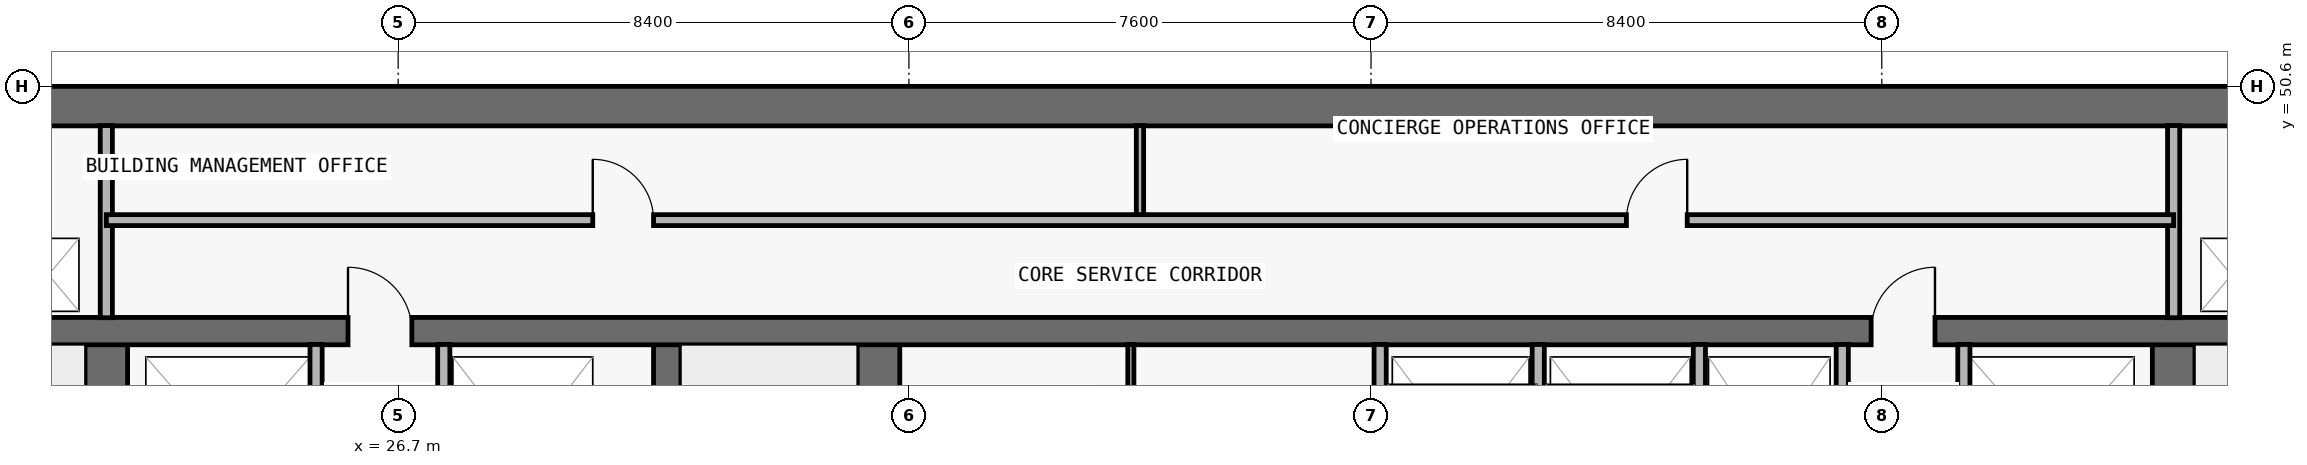
"""IFC4 building model, lengths in metres.
Left out: names, types, materials, properties, quantities, classifications, styles, units other than length and angle.
Written with IfcOpenShell. Run it as: python <this file> out.ifc"""

import sys

from ifc_helpers import new_model, si_unit, direction, frame, frame_2d, origin, place, context, subcontext, project, spatial, rectangle, extrude, element, fill, save


model = new_model("IFC4")
c1 = context("Model", 3, precision=1e-05, world=origin(), true_north=direction((0.0, 1.0)))
c2 = subcontext(c1, "Body", "Model", "MODEL_VIEW")
j1 = project(units=[si_unit("LENGTHUNIT", "METRE"), si_unit("PLANEANGLEUNIT", "RADIAN")], contexts=[c1])
p1 = place(None, origin())
s1 = spatial("IfcSite", under=j1, at=p1, CompositionType="ELEMENT")
p2 = place(p1, origin())
s2 = spatial("IfcBuilding", under=s1, at=p2, CompositionType="ELEMENT")
p3 = place(p2, frame((0.0, 0.0, 173.7)))
s3 = spatial("IfcBuildingStorey", under=s2, at=p3, CompositionType="ELEMENT", Elevation=173.7)
p4 = place(p3, frame((17.95, 50.275, 0.0), z_axis=(0.0, 0.0, 1.0), x_axis=(1.0, 0.0, 0.0)))
e1 = element("IfcWall", 1, at=p4, inside=s3, PredefinedType="SHEAR", context=c2, shape_type="SweptSolid", body=[
    extrude(rectangle(XDim=41.9, YDim=0.65, at=frame_2d((20.95, 0.0))), origin(), (0.0, 0.0, 1.0), 3.05),
])
p5 = place(p3, frame((21.9, 37.0, 0.0), z_axis=(0.0, 0.0, 1.0), x_axis=(0.0, 1.0, 0.0)))
e2 = element("IfcWall", 2, at=p5, inside=s3, PredefinedType="SHEAR", context=c2, shape_type="SweptSolid", body=[
    extrude(rectangle(XDim=9.575, YDim=0.7, at=frame_2d((4.788, 0.0))), origin(), (0.0, 0.0, 1.0), 3.05),
])
p6 = place(p5, frame((0.55, 0.0, 0.0)))
e3 = element("IfcOpeningElement", 3, at=p6, cuts=e2, PredefinedType="OPENING", context=c2, shape_type="SweptSolid", body=[
    extrude(rectangle(XDim=1.1, YDim=2.15, at=frame_2d((0.55, 1.075))), frame((0.0, 0.36, 0.0), z_axis=(0.0, -1.0, 0.0), x_axis=(1.0, 0.0, 0.0)), (0.0, 0.0, 1.0), 0.72),
])
p7 = place(p3, frame((55.9, 37.0, 0.0), z_axis=(0.0, 0.0, 1.0), x_axis=(0.0, 1.0, 0.0)))
e4 = element("IfcWall", 4, at=p7, inside=s3, PredefinedType="SHEAR", context=c2, shape_type="SweptSolid", body=[
    extrude(rectangle(XDim=9.575, YDim=0.7, at=frame_2d((4.788, 0.0))), origin(), (0.0, 0.0, 1.0), 3.05),
])
p8 = place(p7, frame((0.55, 0.0, 0.0)))
e5 = element("IfcOpeningElement", 5, at=p8, cuts=e4, PredefinedType="OPENING", context=c2, shape_type="SweptSolid", body=[
    extrude(rectangle(XDim=1.1, YDim=2.15, at=frame_2d((0.55, 1.075))), frame((0.0, 0.36, 0.0), z_axis=(0.0, -1.0, 0.0), x_axis=(1.0, 0.0, 0.0)), (0.0, 0.0, 1.0), 0.72),
])
p9 = place(p3, frame((31.125, 37.0, 0.0), z_axis=(0.0, 0.0, 1.0), x_axis=(0.0, 1.0, 0.0)))
e6 = element("IfcWall", 6, at=p9, inside=s3, PredefinedType="SHEAR", context=c2, shape_type="SweptSolid", body=[
    extrude(rectangle(XDim=9.575, YDim=0.45, at=frame_2d((4.788, 0.0))), origin(), (0.0, 0.0, 1.0), 3.05),
])
p10 = place(p3, frame((34.6, 37.0, 0.0), z_axis=(0.0, 0.0, 1.0), x_axis=(0.0, 1.0, 0.0)))
e7 = element("IfcWall", 7, at=p10, inside=s3, PredefinedType="SHEAR", context=c2, shape_type="SweptSolid", body=[
    extrude(rectangle(XDim=9.575, YDim=0.7, at=frame_2d((4.788, 0.0))), origin(), (0.0, 0.0, 1.0), 3.05),
])
p11 = place(p3, frame((18.3, 46.575, 0.0), z_axis=(0.0, 0.0, 1.0), x_axis=(1.0, 0.0, 0.0)))
e8 = element("IfcWall", 8, at=p11, inside=s3, PredefinedType="SHEAR", context=c2, shape_type="SweptSolid", body=[
    extrude(rectangle(XDim=41.2, YDim=0.45, at=frame_2d((20.6, 0.0))), origin(), (0.0, 0.0, 1.0), 3.05),
])
p12 = place(p11, frame((7.575, 0.0, 0.0)))
e9 = element("IfcOpeningElement", 9, at=p12, cuts=e8, PredefinedType="OPENING", context=c2, shape_type="SweptSolid", body=[
    extrude(rectangle(XDim=1.05, YDim=2.15, at=frame_2d((0.525, 1.075))), frame((0.0, 0.235, 0.0), z_axis=(0.0, -1.0, 0.0), x_axis=(1.0, 0.0, 0.0)), (0.0, 0.0, 1.0), 0.47),
])
p13 = place(p11, frame((32.625, 0.0, 0.0)))
e10 = element("IfcOpeningElement", 10, at=p13, cuts=e8, PredefinedType="OPENING", context=c2, shape_type="SweptSolid", body=[
    extrude(rectangle(XDim=1.05, YDim=2.15, at=frame_2d((0.525, 1.075))), frame((0.0, 0.235, 0.0), z_axis=(0.0, -1.0, 0.0), x_axis=(1.0, 0.0, 0.0)), (0.0, 0.0, 1.0), 0.47),
])
p14 = place(p3, frame((21.9, 46.795, 0.0), z_axis=(0.0, 0.0, 1.0), x_axis=(0.0, 1.0, 0.0)))
e11 = element("IfcWall", 11, at=p14, inside=s3, PredefinedType="PARTITIONING", context=c2, shape_type="SweptSolid", body=[
    extrude(rectangle(XDim=3.16, YDim=0.2, at=frame_2d((1.58, 0.0))), origin(), (0.0, 0.0, 1.0), 3.05),
])
for number, where, z_axis, x_axis in (
    (12, (25.35, 43.17, 0.0), (0.0, 0.0, 1.0), (0.0, 1.0, 0.0)),
    (13, (27.45, 43.17, 0.0), (0.0, 0.0, 1.0), (0.0, 1.0, 0.0)),
):
    element("IfcWall", number, at=place(p3, frame(where, z_axis=z_axis, x_axis=x_axis)), inside=s3, PredefinedType="PARTITIONING", context=c2, shape_type="SweptSolid", body=[
        extrude(rectangle(XDim=3.185, YDim=0.2, at=frame_2d((1.593, 0.0))), origin(), (0.0, 0.0, 1.0), 3.05),
    ])
p15 = place(p3, frame((38.75, 43.17, 0.0), z_axis=(0.0, 0.0, 1.0), x_axis=(0.0, 1.0, 0.0)))
e14 = element("IfcWall", 14, at=p15, inside=s3, PredefinedType="MOVABLE", context=c2, shape_type="SweptSolid", body=[
    extrude(rectangle(XDim=3.185, YDim=0.1, at=frame_2d((1.593, 0.0))), origin(), (0.0, 0.0, 1.0), 3.05),
])
p16 = place(p3, frame((38.9, 48.4, 0.0), z_axis=(0.0, 0.0, 1.0), x_axis=(0.0, 1.0, 0.0)))
e15 = element("IfcWall", 15, at=p16, inside=s3, PredefinedType="PARTITIONING", context=c2, shape_type="SweptSolid", body=[
    extrude(rectangle(XDim=1.555, YDim=0.12, at=frame_2d((0.778, 0.0))), origin(), (0.0, 0.0, 1.0), 3.05),
])
for number, where, z_axis, x_axis in (
    (16, (42.85, 43.17, 0.0), (0.0, 0.0, 1.0), (0.0, 1.0, 0.0)),
    (17, (45.45, 43.17, 0.0), (0.0, 0.0, 1.0), (0.0, 1.0, 0.0)),
    (18, (48.1, 43.17, 0.0), (0.0, 0.0, 1.0), (0.0, 1.0, 0.0)),
    (19, (50.45, 43.17, 0.0), (0.0, 0.0, 1.0), (0.0, 1.0, 0.0)),
    (20, (52.45, 43.17, 0.0), (0.0, 0.0, 1.0), (0.0, 1.0, 0.0)),
):
    element("IfcWall", number, at=place(p3, frame(where, z_axis=z_axis, x_axis=x_axis)), inside=s3, PredefinedType="PARTITIONING", context=c2, shape_type="SweptSolid", body=[
        extrude(rectangle(XDim=3.185, YDim=0.2, at=frame_2d((1.593, 0.0))), origin(), (0.0, 0.0, 1.0), 3.05),
    ])
p17 = place(p3, frame((55.9, 46.795, 0.0), z_axis=(0.0, 0.0, 1.0), x_axis=(0.0, 1.0, 0.0)))
e21 = element("IfcWall", 21, at=p17, inside=s3, PredefinedType="PARTITIONING", context=c2, shape_type="SweptSolid", body=[
    extrude(rectangle(XDim=3.16, YDim=0.2, at=frame_2d((1.58, 0.0))), origin(), (0.0, 0.0, 1.0), 3.05),
])
p18 = place(p3, frame((21.9, 48.4, 0.0), z_axis=(0.0, 0.0, 1.0), x_axis=(1.0, 0.0, 0.0)))
e22 = element("IfcWall", 22, at=p18, inside=s3, PredefinedType="PARTITIONING", context=c2, shape_type="SweptSolid", body=[
    extrude(rectangle(XDim=34.0, YDim=0.18, at=frame_2d((17.0, 0.0))), origin(), (0.0, 0.0, 1.0), 3.05),
])
p19 = place(p18, frame((8.0, 0.0, 0.0)))
e23 = element("IfcOpeningElement", 23, at=p19, cuts=e22, PredefinedType="OPENING", context=c2, shape_type="SweptSolid", body=[
    extrude(rectangle(XDim=1.0, YDim=2.2, at=frame_2d((0.5, 1.1))), frame((0.0, 0.1, 0.0), z_axis=(0.0, -1.0, 0.0), x_axis=(1.0, 0.0, 0.0)), (0.0, 0.0, 1.0), 0.2),
])
p20 = place(p18, frame((25.0, 0.0, 0.0)))
e24 = element("IfcOpeningElement", 24, at=p20, cuts=e22, PredefinedType="OPENING", context=c2, shape_type="SweptSolid", body=[
    extrude(rectangle(XDim=1.0, YDim=2.2, at=frame_2d((0.5, 1.1))), frame((0.0, 0.1, 0.0), z_axis=(0.0, -1.0, 0.0), x_axis=(1.0, 0.0, 0.0)), (0.0, 0.0, 1.0), 0.2),
])
p21 = place(p12, origin())
e25 = element("IfcDoor", 25, at=p21, inside=s3, OperationType="SINGLE_SWING_LEFT", PredefinedType="DOOR", context=c2, shape_type="SweptSolid", body=[
    extrude(rectangle(XDim=1.05, YDim=2.15, at=frame_2d((0.525, 1.075))), frame((0.0, 0.025, 0.0), z_axis=(0.0, -1.0, 0.0), x_axis=(1.0, 0.0, 0.0)), (0.0, 0.0, 1.0), 0.05),
])
fill(e9, e25)
p22 = place(p13, origin())
e26 = element("IfcDoor", 26, at=p22, inside=s3, OperationType="SINGLE_SWING_RIGHT", PredefinedType="DOOR", context=c2, shape_type="SweptSolid", body=[
    extrude(rectangle(XDim=1.05, YDim=2.15, at=frame_2d((0.525, 1.075))), frame((0.0, 0.025, 0.0), z_axis=(0.0, -1.0, 0.0), x_axis=(1.0, 0.0, 0.0)), (0.0, 0.0, 1.0), 0.05),
])
fill(e10, e26)
p23 = place(p19, origin())
e27 = element("IfcDoor", 27, at=p23, inside=s3, OperationType="SINGLE_SWING_LEFT", PredefinedType="DOOR", context=c2, shape_type="SweptSolid", body=[
    extrude(rectangle(XDim=1.0, YDim=2.2, at=frame_2d((0.5, 1.1))), frame((0.0, 0.025, 0.0), z_axis=(0.0, -1.0, 0.0), x_axis=(1.0, 0.0, 0.0)), (0.0, 0.0, 1.0), 0.05),
])
fill(e23, e27)
p24 = place(p20, origin())
e28 = element("IfcDoor", 28, at=p24, inside=s3, OperationType="SINGLE_SWING_RIGHT", PredefinedType="DOOR", context=c2, shape_type="SweptSolid", body=[
    extrude(rectangle(XDim=1.0, YDim=2.2, at=frame_2d((0.5, 1.1))), frame((0.0, 0.025, 0.0), z_axis=(0.0, -1.0, 0.0), x_axis=(1.0, 0.0, 0.0)), (0.0, 0.0, 1.0), 0.05),
])
fill(e24, e28)
save(model, sys.argv[1])
